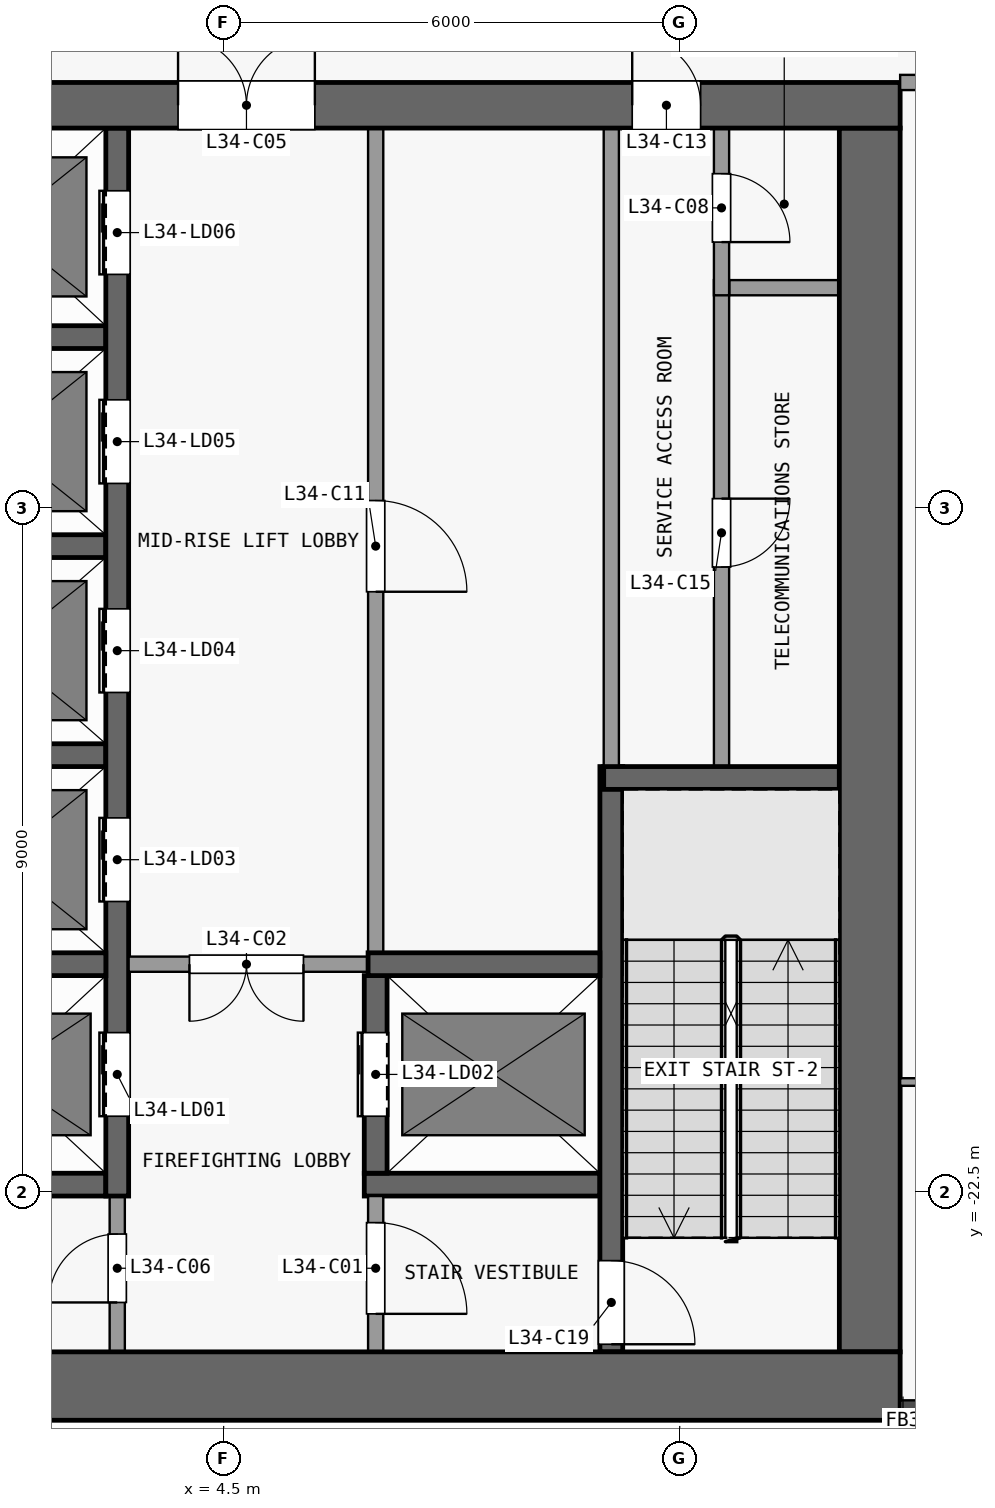
"""IFC4 building model, lengths in metres.
Left out: names, types, materials, properties, quantities, classifications, styles, units other than length and angle.
Written with IfcOpenShell. Run it as: python <this file> out.ifc"""

import sys

from ifc_helpers import new_model, si_unit, direction, frame, frame_2d, origin, place, context, subcontext, project, spatial, rectangle, extrude, element, fill, save


model = new_model("IFC4")
c1 = context("Model", 3, precision=1e-05, world=origin(), true_north=direction((0.0, 1.0)))
c2 = subcontext(c1, "Body", "Model", "MODEL_VIEW")
j1 = project(units=[si_unit("LENGTHUNIT", "METRE"), si_unit("PLANEANGLEUNIT", "RADIAN")], contexts=[c1])
p1 = place(None, origin())
s1 = spatial("IfcSite", under=j1, at=p1, CompositionType="ELEMENT")
p2 = place(p1, origin())
s2 = spatial("IfcBuilding", under=s1, at=p2, CompositionType="ELEMENT")
p3 = place(p2, frame((0.0, 0.0, 138.9)))
s3 = spatial("IfcBuildingStorey", under=s2, at=p3, CompositionType="ELEMENT", Elevation=138.9)
p4 = place(p3, frame((-13.4, -25.05, 0.0), z_axis=(0.0, 0.0, 1.0), x_axis=(1.0, 0.0, 0.0)))
e1 = element("IfcWall", 1, at=p4, inside=s3, PredefinedType="SHEAR", context=c2, shape_type="SweptSolid", body=[
    extrude(rectangle(XDim=26.8, YDim=0.9, at=frame_2d((13.4, 0.0))), origin(), (0.0, 0.0, 1.0), 4.55),
])
p5 = place(p3, frame((-13.4, -8.2, 0.0), z_axis=(0.0, 0.0, 1.0), x_axis=(1.0, 0.0, 0.0)))
e2 = element("IfcWall", 2, at=p5, inside=s3, PredefinedType="SHEAR", context=c2, shape_type="SweptSolid", body=[
    extrude(rectangle(XDim=26.8, YDim=0.6, at=frame_2d((13.4, 0.0))), origin(), (0.0, 0.0, 1.0), 4.55),
])
p6 = place(p5, frame((7.7, 0.0, 0.0)))
e3 = element("IfcOpeningElement", 3, at=p6, cuts=e2, PredefinedType="OPENING", context=c2, shape_type="SweptSolid", body=[
    extrude(rectangle(XDim=1.8, YDim=2.1, at=frame_2d((0.9, 1.05))), frame((0.0, 0.31, 0.0), z_axis=(0.0, -1.0, 0.0), x_axis=(1.0, 0.0, 0.0)), (0.0, 0.0, 1.0), 0.62),
])
p7 = place(p5, frame((17.3, 0.0, 0.0)))
e4 = element("IfcOpeningElement", 4, at=p7, cuts=e2, PredefinedType="OPENING", context=c2, shape_type="SweptSolid", body=[
    extrude(rectangle(XDim=1.8, YDim=2.1, at=frame_2d((0.9, 1.05))), frame((0.0, 0.31, 0.0), z_axis=(0.0, -1.0, 0.0), x_axis=(1.0, 0.0, 0.0)), (0.0, 0.0, 1.0), 0.62),
])
p8 = place(p5, frame((2.625, 0.0, 0.0)))
e5 = element("IfcOpeningElement", 5, at=p8, cuts=e2, PredefinedType="OPENING", context=c2, shape_type="SweptSolid", body=[
    extrude(rectangle(XDim=0.9, YDim=2.1, at=frame_2d((0.45, 1.05))), frame((0.0, 0.31, 0.0), z_axis=(0.0, -1.0, 0.0), x_axis=(1.0, 0.0, 0.0)), (0.0, 0.0, 1.0), 0.62),
])
p9 = place(p5, frame((23.275, 0.0, 0.0)))
e6 = element("IfcOpeningElement", 6, at=p9, cuts=e2, PredefinedType="OPENING", context=c2, shape_type="SweptSolid", body=[
    extrude(rectangle(XDim=0.9, YDim=2.1, at=frame_2d((0.45, 1.05))), frame((0.0, 0.31, 0.0), z_axis=(0.0, -1.0, 0.0), x_axis=(1.0, 0.0, 0.0)), (0.0, 0.0, 1.0), 0.62),
])
p10 = place(p3, frame((13.0, -24.6, 0.0), z_axis=(0.0, 0.0, 1.0), x_axis=(0.0, 1.0, 0.0)))
e7 = element("IfcWall", 7, at=p10, inside=s3, PredefinedType="SHEAR", context=c2, shape_type="SweptSolid", body=[
    extrude(rectangle(XDim=16.1, YDim=0.8, at=frame_2d((8.05, 0.0))), origin(), (0.0, 0.0, 1.0), 4.55),
])
p11 = place(p3, frame((-3.25, -22.4, 0.0), z_axis=(0.0, 0.0, 1.0), x_axis=(1.0, 0.0, 0.0)))
e8 = element("IfcWall", 8, at=p11, inside=s3, PredefinedType="SHEAR", context=c2, shape_type="SweptSolid", body=[
    extrude(rectangle(XDim=6.2, YDim=0.3, at=frame_2d((3.1, 0.0))), origin(), (0.0, 0.0, 1.0), 4.55),
])
p12 = place(p3, frame((6.35, -22.4, 0.0), z_axis=(0.0, 0.0, 1.0), x_axis=(1.0, 0.0, 0.0)))
e9 = element("IfcWall", 9, at=p12, inside=s3, PredefinedType="SHEAR", context=c2, shape_type="SweptSolid", body=[
    extrude(rectangle(XDim=3.1, YDim=0.3, at=frame_2d((1.55, 0.0))), origin(), (0.0, 0.0, 1.0), 4.55),
])
p13 = place(p3, frame((0.15, -19.5, 0.0), z_axis=(0.0, 0.0, 1.0), x_axis=(1.0, 0.0, 0.0)))
e10 = element("IfcWall", 10, at=p13, inside=s3, PredefinedType="SHEAR", context=c2, shape_type="SweptSolid", body=[
    extrude(rectangle(XDim=2.8, YDim=0.3, at=frame_2d((1.4, 0.0))), origin(), (0.0, 0.0, 1.0), 4.55),
])
p14 = place(p3, frame((6.4, -19.5, 0.0), z_axis=(0.0, 0.0, 1.0), x_axis=(-1.0, 0.0, 0.0)))
e11 = element("IfcWall", 11, at=p14, inside=s3, PredefinedType="PARTITIONING", context=c2, shape_type="SweptSolid", body=[
    extrude(rectangle(XDim=3.15, YDim=0.2, at=frame_2d((1.575, 0.0))), origin(), (0.0, 0.0, 1.0), 4.55),
])
p15 = place(p14, frame((0.85, 0.0, 0.0)))
e12 = element("IfcOpeningElement", 12, at=p15, cuts=e11, PredefinedType="OPENING", context=c2, shape_type="SweptSolid", body=[
    extrude(rectangle(XDim=1.5, YDim=2.1, at=frame_2d((0.75, 1.05))), frame((0.0, 0.11, 0.0), z_axis=(0.0, -1.0, 0.0), x_axis=(1.0, 0.0, 0.0)), (0.0, 0.0, 1.0), 0.22),
])
p16 = place(p3, frame((6.4, -19.5, 0.0), z_axis=(0.0, 0.0, 1.0), x_axis=(1.0, 0.0, 0.0)))
e13 = element("IfcWall", 13, at=p16, inside=s3, PredefinedType="SHEAR", context=c2, shape_type="SweptSolid", body=[
    extrude(rectangle(XDim=3.05, YDim=0.3, at=frame_2d((1.525, 0.0))), origin(), (0.0, 0.0, 1.0), 4.55),
])
p17 = place(p3, frame((9.5, -17.05, 0.0), z_axis=(0.0, 0.0, 1.0), x_axis=(1.0, 0.0, 0.0)))
e14 = element("IfcWall", 14, at=p17, inside=s3, PredefinedType="SHEAR", context=c2, shape_type="SweptSolid", body=[
    extrude(rectangle(XDim=3.1, YDim=0.3, at=frame_2d((1.55, 0.0))), origin(), (0.0, 0.0, 1.0), 4.55),
])
for number, where, z_axis, x_axis in (
    (15, (0.15, -16.75, 0.0), (0.0, 0.0, 1.0), (1.0, 0.0, 0.0)),
    (16, (0.15, -14.0, 0.0), (0.0, 0.0, 1.0), (1.0, 0.0, 0.0)),
    (17, (0.15, -11.25, 0.0), (0.0, 0.0, 1.0), (1.0, 0.0, 0.0)),
):
    element("IfcWall", number, at=place(p3, frame(where, z_axis=z_axis, x_axis=x_axis)), inside=s3, PredefinedType="SHEAR", context=c2, shape_type="SweptSolid", body=[
        extrude(rectangle(XDim=2.8, YDim=0.3, at=frame_2d((1.4, 0.0))), origin(), (0.0, 0.0, 1.0), 4.55),
    ])
p18 = place(p3, frame((11.15, -10.6, 0.0), z_axis=(0.0, 0.0, 1.0), x_axis=(1.0, 0.0, 0.0)))
e18 = element("IfcWall", 18, at=p18, inside=s3, PredefinedType="PARTITIONING", context=c2, shape_type="SweptSolid", body=[
    extrude(rectangle(XDim=1.45, YDim=0.2, at=frame_2d((0.725, 0.0))), origin(), (0.0, 0.0, 1.0), 4.55),
])
p19 = place(p3, frame((3.1, -24.6, 0.0), z_axis=(0.0, 0.0, 1.0), x_axis=(0.0, 1.0, 0.0)))
e19 = element("IfcWall", 19, at=p19, inside=s3, PredefinedType="PARTITIONING", context=c2, shape_type="SweptSolid", body=[
    extrude(rectangle(XDim=2.05, YDim=0.2, at=frame_2d((1.025, 0.0))), origin(), (0.0, 0.0, 1.0), 4.55),
])
p20 = place(p19, frame((0.65, 0.0, 0.0)))
e20 = element("IfcOpeningElement", 20, at=p20, cuts=e19, PredefinedType="OPENING", context=c2, shape_type="SweptSolid", body=[
    extrude(rectangle(XDim=0.9, YDim=2.1, at=frame_2d((0.45, 1.05))), frame((0.0, 0.11, 0.0), z_axis=(0.0, -1.0, 0.0), x_axis=(1.0, 0.0, 0.0)), (0.0, 0.0, 1.0), 0.22),
])
p21 = place(p3, frame((3.1, -22.55, 0.0), z_axis=(0.0, 0.0, 1.0), x_axis=(0.0, 1.0, 0.0)))
e21 = element("IfcWall", 21, at=p21, inside=s3, PredefinedType="SHEAR", context=c2, shape_type="SweptSolid", body=[
    extrude(rectangle(XDim=14.05, YDim=0.3, at=frame_2d((7.025, 0.0))), origin(), (0.0, 0.0, 1.0), 4.55),
])
p22 = place(p21, frame((1.05, 0.0, 0.0)))
e22 = element("IfcOpeningElement", 22, at=p22, cuts=e21, PredefinedType="OPENING", context=c2, shape_type="SweptSolid", body=[
    extrude(rectangle(XDim=1.1, YDim=2.1, at=frame_2d((0.55, 1.05))), frame((0.0, 0.16, 0.0), z_axis=(0.0, -1.0, 0.0), x_axis=(1.0, 0.0, 0.0)), (0.0, 0.0, 1.0), 0.32),
])
p23 = place(p21, frame((3.875, 0.0, 0.0)))
e23 = element("IfcOpeningElement", 23, at=p23, cuts=e21, PredefinedType="OPENING", context=c2, shape_type="SweptSolid", body=[
    extrude(rectangle(XDim=1.1, YDim=2.1, at=frame_2d((0.55, 1.05))), frame((0.0, 0.16, 0.0), z_axis=(0.0, -1.0, 0.0), x_axis=(1.0, 0.0, 0.0)), (0.0, 0.0, 1.0), 0.32),
])
p24 = place(p21, frame((6.625, 0.0, 0.0)))
e24 = element("IfcOpeningElement", 24, at=p24, cuts=e21, PredefinedType="OPENING", context=c2, shape_type="SweptSolid", body=[
    extrude(rectangle(XDim=1.1, YDim=2.1, at=frame_2d((0.55, 1.05))), frame((0.0, 0.16, 0.0), z_axis=(0.0, -1.0, 0.0), x_axis=(1.0, 0.0, 0.0)), (0.0, 0.0, 1.0), 0.32),
])
p25 = place(p21, frame((9.375, 0.0, 0.0)))
e25 = element("IfcOpeningElement", 25, at=p25, cuts=e21, PredefinedType="OPENING", context=c2, shape_type="SweptSolid", body=[
    extrude(rectangle(XDim=1.1, YDim=2.1, at=frame_2d((0.55, 1.05))), frame((0.0, 0.16, 0.0), z_axis=(0.0, -1.0, 0.0), x_axis=(1.0, 0.0, 0.0)), (0.0, 0.0, 1.0), 0.32),
])
p26 = place(p21, frame((12.125, 0.0, 0.0)))
e26 = element("IfcOpeningElement", 26, at=p26, cuts=e21, PredefinedType="OPENING", context=c2, shape_type="SweptSolid", body=[
    extrude(rectangle(XDim=1.1, YDim=2.1, at=frame_2d((0.55, 1.05))), frame((0.0, 0.16, 0.0), z_axis=(0.0, -1.0, 0.0), x_axis=(1.0, 0.0, 0.0)), (0.0, 0.0, 1.0), 0.32),
])
p27 = place(p3, frame((6.5, -22.55, 0.0), z_axis=(0.0, 0.0, 1.0), x_axis=(0.0, -1.0, 0.0)))
e27 = element("IfcWall", 27, at=p27, inside=s3, PredefinedType="PARTITIONING", context=c2, shape_type="SweptSolid", body=[
    extrude(rectangle(XDim=2.05, YDim=0.2, at=frame_2d((1.025, 0.0))), origin(), (0.0, 0.0, 1.0), 4.55),
])
p28 = place(p27, frame((0.35, 0.0, 0.0)))
e28 = element("IfcOpeningElement", 28, at=p28, cuts=e27, PredefinedType="OPENING", context=c2, shape_type="SweptSolid", body=[
    extrude(rectangle(XDim=1.2, YDim=2.1, at=frame_2d((0.6, 1.05))), frame((0.0, 0.11, 0.0), z_axis=(0.0, -1.0, 0.0), x_axis=(1.0, 0.0, 0.0)), (0.0, 0.0, 1.0), 0.22),
])
p29 = place(p3, frame((6.5, -22.25, 0.0), z_axis=(0.0, 0.0, 1.0), x_axis=(0.0, 1.0, 0.0)))
e29 = element("IfcWall", 29, at=p29, inside=s3, PredefinedType="SHEAR", context=c2, shape_type="SweptSolid", body=[
    extrude(rectangle(XDim=2.6, YDim=0.3, at=frame_2d((1.3, 0.0))), origin(), (0.0, 0.0, 1.0), 4.55),
])
p30 = place(p29, frame((0.75, 0.0, 0.0)))
e30 = element("IfcOpeningElement", 30, at=p30, cuts=e29, PredefinedType="OPENING", context=c2, shape_type="SweptSolid", body=[
    extrude(rectangle(XDim=1.1, YDim=2.1, at=frame_2d((0.55, 1.05))), frame((0.0, 0.16, 0.0), z_axis=(0.0, -1.0, 0.0), x_axis=(1.0, 0.0, 0.0)), (0.0, 0.0, 1.0), 0.32),
])
p31 = place(p3, frame((6.5, -8.5, 0.0), z_axis=(0.0, 0.0, 1.0), x_axis=(0.0, -1.0, 0.0)))
e31 = element("IfcWall", 31, at=p31, inside=s3, PredefinedType="PARTITIONING", context=c2, shape_type="SweptSolid", body=[
    extrude(rectangle(XDim=10.85, YDim=0.2, at=frame_2d((5.425, 0.0))), origin(), (0.0, 0.0, 1.0), 4.55),
])
p32 = place(p31, frame((4.9, 0.0, 0.0)))
e32 = element("IfcOpeningElement", 32, at=p32, cuts=e31, PredefinedType="OPENING", context=c2, shape_type="SweptSolid", body=[
    extrude(rectangle(XDim=1.2, YDim=2.1, at=frame_2d((0.6, 1.05))), frame((0.0, 0.11, 0.0), z_axis=(0.0, -1.0, 0.0), x_axis=(1.0, 0.0, 0.0)), (0.0, 0.0, 1.0), 0.22),
])
p33 = place(p3, frame((9.6, -16.9, 0.0), z_axis=(0.0, 0.0, 1.0), x_axis=(0.0, -1.0, 0.0)))
e33 = element("IfcWall", 33, at=p33, inside=s3, PredefinedType="SHEAR", context=c2, shape_type="SweptSolid", body=[
    extrude(rectangle(XDim=7.7, YDim=0.3, at=frame_2d((3.85, 0.0))), origin(), (0.0, 0.0, 1.0), 4.55),
])
p34 = place(p33, frame((6.5, 0.0, 0.0)))
e34 = element("IfcOpeningElement", 34, at=p34, cuts=e33, PredefinedType="OPENING", context=c2, shape_type="SweptSolid", body=[
    extrude(rectangle(XDim=1.1, YDim=2.1, at=frame_2d((0.55, 1.05))), frame((0.0, 0.16, 0.0), z_axis=(0.0, -1.0, 0.0), x_axis=(1.0, 0.0, 0.0)), (0.0, 0.0, 1.0), 0.32),
])
p35 = place(p3, frame((9.6, -16.9, 0.0), z_axis=(0.0, 0.0, 1.0), x_axis=(0.0, 1.0, 0.0)))
e35 = element("IfcWall", 35, at=p35, inside=s3, PredefinedType="PARTITIONING", context=c2, shape_type="SweptSolid", body=[
    extrude(rectangle(XDim=8.4, YDim=0.2, at=frame_2d((4.2, 0.0))), origin(), (0.0, 0.0, 1.0), 4.55),
])
p36 = place(p3, frame((11.05, -10.5, 0.0), z_axis=(0.0, 0.0, 1.0), x_axis=(0.0, -1.0, 0.0)))
e36 = element("IfcWall", 36, at=p36, inside=s3, PredefinedType="PARTITIONING", context=c2, shape_type="SweptSolid", body=[
    extrude(rectangle(XDim=6.4, YDim=0.2, at=frame_2d((3.2, 0.0))), origin(), (0.0, 0.0, 1.0), 4.55),
])
p37 = place(p36, frame((2.875, 0.0, 0.0)))
e37 = element("IfcOpeningElement", 37, at=p37, cuts=e36, PredefinedType="OPENING", context=c2, shape_type="SweptSolid", body=[
    extrude(rectangle(XDim=0.9, YDim=2.1, at=frame_2d((0.45, 1.05))), frame((0.0, 0.11, 0.0), z_axis=(0.0, -1.0, 0.0), x_axis=(1.0, 0.0, 0.0)), (0.0, 0.0, 1.0), 0.22),
])
p38 = place(p3, frame((11.05, -8.5, 0.0), z_axis=(0.0, 0.0, 1.0), x_axis=(0.0, -1.0, 0.0)))
e38 = element("IfcWall", 38, at=p38, inside=s3, PredefinedType="PARTITIONING", context=c2, shape_type="SweptSolid", body=[
    extrude(rectangle(XDim=2.2, YDim=0.2, at=frame_2d((1.1, 0.0))), origin(), (0.0, 0.0, 1.0), 4.55),
])
p39 = place(p38, frame((0.6, 0.0, 0.0)))
e39 = element("IfcOpeningElement", 39, at=p39, cuts=e38, PredefinedType="OPENING", context=c2, shape_type="SweptSolid", body=[
    extrude(rectangle(XDim=0.9, YDim=2.1, at=frame_2d((0.45, 1.05))), frame((0.0, 0.11, 0.0), z_axis=(0.0, -1.0, 0.0), x_axis=(1.0, 0.0, 0.0)), (0.0, 0.0, 1.0), 0.22),
])
p40 = place(p3, frame((13.4, -21.05, 0.0), z_axis=(0.0, 0.0, 1.0), x_axis=(1.0, 0.0, 0.0)))
e40 = element("IfcWall", 40, at=p40, inside=s3, PredefinedType="PARTITIONING", context=c2, shape_type="SweptSolid", body=[
    extrude(rectangle(XDim=11.838, YDim=0.1, at=frame_2d((5.919, 0.0))), origin(), (0.0, 0.0, 1.0), 4.55),
])
p41 = place(p40, frame((5.5, 0.0, 0.0)))
e41 = element("IfcOpeningElement", 41, at=p41, cuts=e40, PredefinedType="OPENING", context=c2, shape_type="SweptSolid", body=[
    extrude(rectangle(XDim=1.0, YDim=2.1, at=frame_2d((0.5, 1.05))), frame((0.0, 0.06, 0.0), z_axis=(0.0, -1.0, 0.0), x_axis=(1.0, 0.0, 0.0)), (0.0, 0.0, 1.0), 0.12),
])
p42 = place(p3, frame((13.4, -7.9, 0.0), z_axis=(0.0, 0.0, 1.0), x_axis=(1.0, 0.0, 0.0)))
e42 = element("IfcWall", 42, at=p42, inside=s3, PredefinedType="PARTITIONING", context=c2, shape_type="SweptSolid", body=[
    extrude(rectangle(XDim=11.838, YDim=0.2, at=frame_2d((5.919, 0.0))), origin(), (0.0, 0.0, 1.0), 4.55),
])
p43 = place(p42, frame((1.5, 0.0, 0.0)))
e43 = element("IfcOpeningElement", 43, at=p43, cuts=e42, PredefinedType="OPENING", context=c2, shape_type="SweptSolid", body=[
    extrude(rectangle(XDim=1.8, YDim=2.1, at=frame_2d((0.9, 1.05))), frame((0.0, 0.11, 0.0), z_axis=(0.0, -1.0, 0.0), x_axis=(1.0, 0.0, 0.0)), (0.0, 0.0, 1.0), 0.22),
])
p44 = place(p42, frame((8.7, 0.0, 0.0)))
e44 = element("IfcOpeningElement", 44, at=p44, cuts=e42, PredefinedType="OPENING", context=c2, shape_type="SweptSolid", body=[
    extrude(rectangle(XDim=1.8, YDim=2.1, at=frame_2d((0.9, 1.05))), frame((0.0, 0.11, 0.0), z_axis=(0.0, -1.0, 0.0), x_axis=(1.0, 0.0, 0.0)), (0.0, 0.0, 1.0), 0.22),
])
p45 = place(p22, origin())
e45 = element("IfcDoor", 45, at=p45, inside=s3, OperationType="DOUBLE_DOOR_SLIDING", PredefinedType="DOOR", context=c2, shape_type="SweptSolid", body=[
    extrude(rectangle(XDim=1.1, YDim=2.1, at=frame_2d((0.55, 1.05))), frame((0.0, 0.025, 0.0), z_axis=(0.0, -1.0, 0.0), x_axis=(1.0, 0.0, 0.0)), (0.0, 0.0, 1.0), 0.05),
])
fill(e22, e45)
p46 = place(p30, origin())
e46 = element("IfcDoor", 46, at=p46, inside=s3, OperationType="DOUBLE_DOOR_SLIDING", PredefinedType="DOOR", context=c2, shape_type="SweptSolid", body=[
    extrude(rectangle(XDim=1.1, YDim=2.1, at=frame_2d((0.55, 1.05))), frame((0.0, 0.025, 0.0), z_axis=(0.0, -1.0, 0.0), x_axis=(1.0, 0.0, 0.0)), (0.0, 0.0, 1.0), 0.05),
])
fill(e30, e46)
p47 = place(p23, origin())
e47 = element("IfcDoor", 47, at=p47, inside=s3, OperationType="DOUBLE_DOOR_SLIDING", PredefinedType="DOOR", context=c2, shape_type="SweptSolid", body=[
    extrude(rectangle(XDim=1.1, YDim=2.1, at=frame_2d((0.55, 1.05))), frame((0.0, 0.025, 0.0), z_axis=(0.0, -1.0, 0.0), x_axis=(1.0, 0.0, 0.0)), (0.0, 0.0, 1.0), 0.05),
])
fill(e23, e47)
p48 = place(p24, origin())
e48 = element("IfcDoor", 48, at=p48, inside=s3, OperationType="DOUBLE_DOOR_SLIDING", PredefinedType="DOOR", context=c2, shape_type="SweptSolid", body=[
    extrude(rectangle(XDim=1.1, YDim=2.1, at=frame_2d((0.55, 1.05))), frame((0.0, 0.025, 0.0), z_axis=(0.0, -1.0, 0.0), x_axis=(1.0, 0.0, 0.0)), (0.0, 0.0, 1.0), 0.05),
])
fill(e24, e48)
p49 = place(p25, origin())
e49 = element("IfcDoor", 49, at=p49, inside=s3, OperationType="DOUBLE_DOOR_SLIDING", PredefinedType="DOOR", context=c2, shape_type="SweptSolid", body=[
    extrude(rectangle(XDim=1.1, YDim=2.1, at=frame_2d((0.55, 1.05))), frame((0.0, 0.025, 0.0), z_axis=(0.0, -1.0, 0.0), x_axis=(1.0, 0.0, 0.0)), (0.0, 0.0, 1.0), 0.05),
])
fill(e25, e49)
p50 = place(p26, origin())
e50 = element("IfcDoor", 50, at=p50, inside=s3, OperationType="DOUBLE_DOOR_SLIDING", PredefinedType="DOOR", context=c2, shape_type="SweptSolid", body=[
    extrude(rectangle(XDim=1.1, YDim=2.1, at=frame_2d((0.55, 1.05))), frame((0.0, 0.025, 0.0), z_axis=(0.0, -1.0, 0.0), x_axis=(1.0, 0.0, 0.0)), (0.0, 0.0, 1.0), 0.05),
])
fill(e26, e50)
p51 = place(p28, origin())
e51 = element("IfcDoor", 51, at=p51, inside=s3, OperationType="SINGLE_SWING_RIGHT", PredefinedType="DOOR", context=c2, shape_type="SweptSolid", body=[
    extrude(rectangle(XDim=1.2, YDim=2.1, at=frame_2d((0.6, 1.05))), frame((0.0, 0.025, 0.0), z_axis=(0.0, -1.0, 0.0), x_axis=(1.0, 0.0, 0.0)), (0.0, 0.0, 1.0), 0.05),
])
fill(e28, e51)
p52 = place(p15, origin())
e52 = element("IfcDoor", 52, at=p52, inside=s3, OperationType="DOUBLE_DOOR_SINGLE_SWING", PredefinedType="DOOR", context=c2, shape_type="SweptSolid", body=[
    extrude(rectangle(XDim=1.5, YDim=2.1, at=frame_2d((0.75, 1.05))), frame((0.0, 0.025, 0.0), z_axis=(0.0, -1.0, 0.0), x_axis=(1.0, 0.0, 0.0)), (0.0, 0.0, 1.0), 0.05),
])
fill(e12, e52)
p53 = place(p7, origin())
e53 = element("IfcDoor", 53, at=p53, inside=s3, OperationType="DOUBLE_DOOR_SINGLE_SWING", PredefinedType="DOOR", context=c2, shape_type="SweptSolid", body=[
    extrude(rectangle(XDim=1.8, YDim=2.1, at=frame_2d((0.9, 1.05))), frame((0.0, 0.025, 0.0), z_axis=(0.0, -1.0, 0.0), x_axis=(1.0, 0.0, 0.0)), (0.0, 0.0, 1.0), 0.05),
])
fill(e4, e53)
p54 = place(p20, origin())
e54 = element("IfcDoor", 54, at=p54, inside=s3, OperationType="SINGLE_SWING_LEFT", PredefinedType="DOOR", context=c2, shape_type="SweptSolid", body=[
    extrude(rectangle(XDim=0.9, YDim=2.1, at=frame_2d((0.45, 1.05))), frame((0.0, 0.025, 0.0), z_axis=(0.0, -1.0, 0.0), x_axis=(1.0, 0.0, 0.0)), (0.0, 0.0, 1.0), 0.05),
])
fill(e20, e54)
p55 = place(p39, origin())
e55 = element("IfcDoor", 55, at=p55, inside=s3, OperationType="SINGLE_SWING_RIGHT", PredefinedType="DOOR", context=c2, shape_type="SweptSolid", body=[
    extrude(rectangle(XDim=0.9, YDim=2.1, at=frame_2d((0.45, 1.05))), frame((0.0, 0.025, 0.0), z_axis=(0.0, -1.0, 0.0), x_axis=(1.0, 0.0, 0.0)), (0.0, 0.0, 1.0), 0.05),
])
fill(e39, e55)
p56 = place(p32, origin())
e56 = element("IfcDoor", 56, at=p56, inside=s3, OperationType="SINGLE_SWING_RIGHT", PredefinedType="DOOR", context=c2, shape_type="SweptSolid", body=[
    extrude(rectangle(XDim=1.2, YDim=2.1, at=frame_2d((0.6, 1.05))), frame((0.0, 0.025, 0.0), z_axis=(0.0, -1.0, 0.0), x_axis=(1.0, 0.0, 0.0)), (0.0, 0.0, 1.0), 0.05),
])
fill(e32, e56)
p57 = place(p9, origin())
e57 = element("IfcDoor", 57, at=p57, inside=s3, OperationType="SINGLE_SWING_LEFT", PredefinedType="DOOR", context=c2, shape_type="SweptSolid", body=[
    extrude(rectangle(XDim=0.9, YDim=2.1, at=frame_2d((0.45, 1.05))), frame((0.0, 0.025, 0.0), z_axis=(0.0, -1.0, 0.0), x_axis=(1.0, 0.0, 0.0)), (0.0, 0.0, 1.0), 0.05),
])
fill(e6, e57)
p58 = place(p37, origin())
e58 = element("IfcDoor", 58, at=p58, inside=s3, OperationType="SINGLE_SWING_LEFT", PredefinedType="DOOR", context=c2, shape_type="SweptSolid", body=[
    extrude(rectangle(XDim=0.9, YDim=2.1, at=frame_2d((0.45, 1.05))), frame((0.0, 0.025, 0.0), z_axis=(0.0, -1.0, 0.0), x_axis=(1.0, 0.0, 0.0)), (0.0, 0.0, 1.0), 0.05),
])
fill(e37, e58)
p59 = place(p34, origin())
e59 = element("IfcDoor", 59, at=p59, inside=s3, OperationType="SINGLE_SWING_RIGHT", PredefinedType="DOOR", context=c2, shape_type="SweptSolid", body=[
    extrude(rectangle(XDim=1.1, YDim=2.1, at=frame_2d((0.55, 1.05))), frame((0.0, 0.025, 0.0), z_axis=(0.0, -1.0, 0.0), x_axis=(1.0, 0.0, 0.0)), (0.0, 0.0, 1.0), 0.05),
])
fill(e34, e59)
save(model, sys.argv[1])
